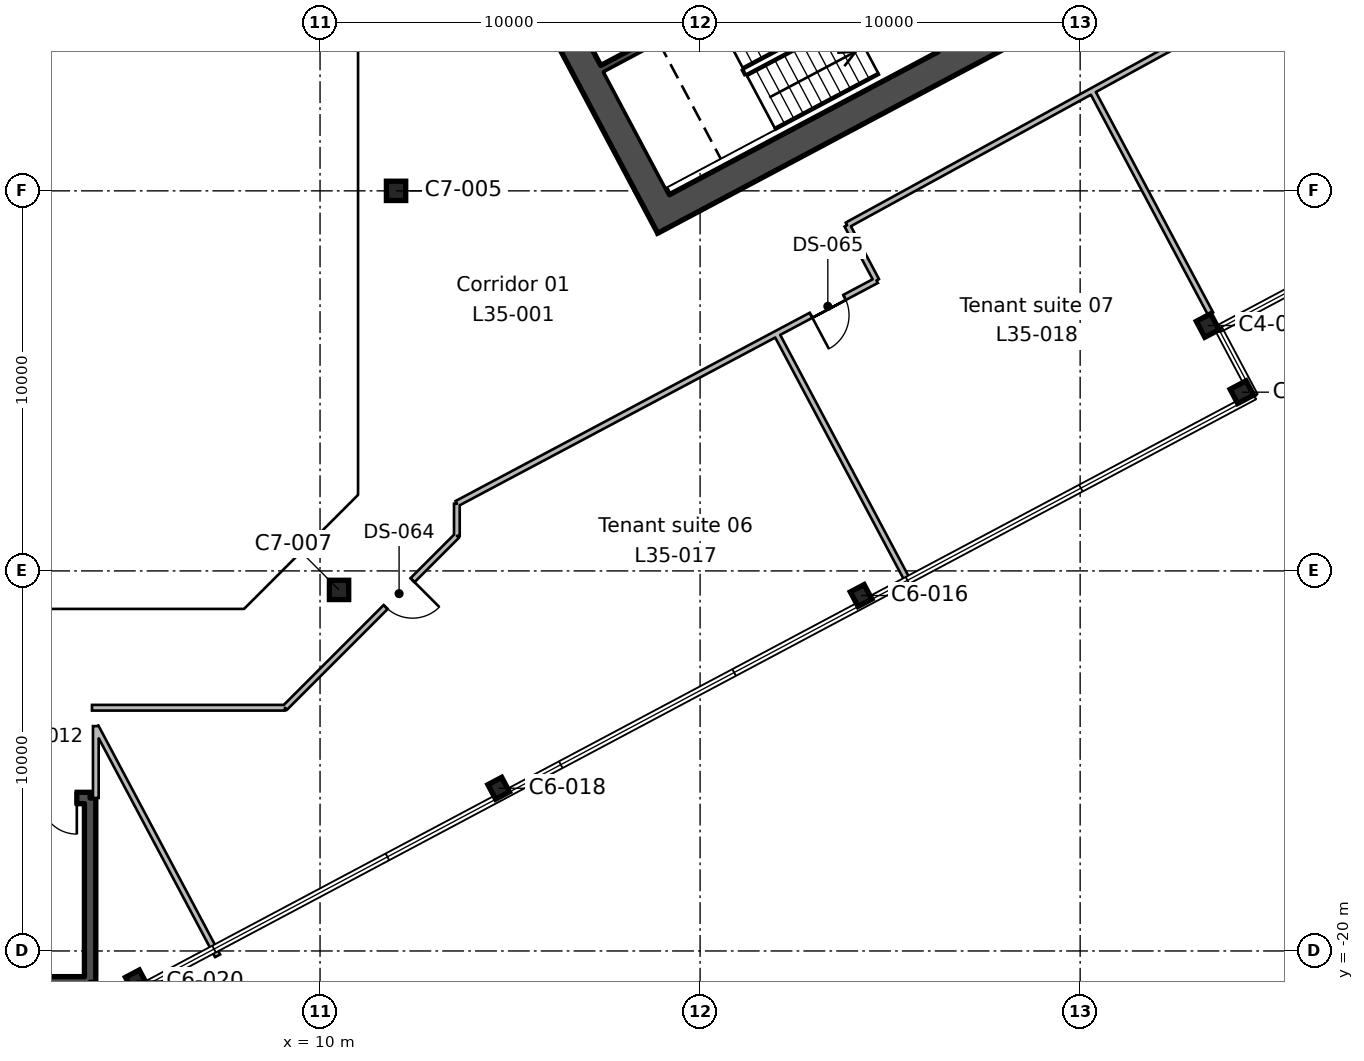
"""IFC4 building model, lengths in metres.
Left out: names, types, materials, properties, quantities, classifications, styles, units other than length and angle.
Written with IfcOpenShell. Run it as: python <this file> out.ifc"""

import sys

from ifc_helpers import new_model, si_unit, direction, frame, frame_2d, origin, origin_2d, place, context, subcontext, project, spatial, rectangle, hollow_rectangle, i_section, extrude, element, fill, save


model = new_model("IFC4")
c1 = context("Model", 3, precision=1e-05, world=origin(), true_north=direction((0.0, 1.0)))
c2 = subcontext(c1, "Body", "Model", "MODEL_VIEW")
j1 = project(units=[si_unit("LENGTHUNIT", "METRE"), si_unit("PLANEANGLEUNIT", "RADIAN")], contexts=[c1])
p1 = place(None, origin())
s1 = spatial("IfcSite", under=j1, at=p1, CompositionType="ELEMENT")
p2 = place(p1, origin())
s2 = spatial("IfcBuilding", under=s1, at=p2, CompositionType="ELEMENT")
p3 = place(p2, frame((0.0, 0.0, 166.2)))
s3 = spatial("IfcBuildingStorey", under=s2, at=p3, CompositionType="ELEMENT", Elevation=166.2)
for number, where, z_axis, x_axis in (
    (1, (5.164, -20.789, 0.0), (0.0, 0.0, 1.0), (0.883, 0.469, 0.0)),
    (2, (14.7, -15.719, 0.0), (0.0, 0.0, 1.0), (0.883, 0.469, 0.0)),
    (3, (24.236, -10.648, 0.0), (0.0, 0.0, 1.0), (0.883, 0.469, 0.0)),
):
    element("IfcColumn", number, at=place(p3, frame(where, z_axis=z_axis, x_axis=x_axis)), inside=s3, PredefinedType="COLUMN", context=c2, shape_type="SweptSolid", body=[
        extrude(i_section(OverallWidth=0.412, OverallDepth=0.434, WebThickness=0.036, FlangeThickness=0.057, FilletRadius=0.015, at=origin_2d()), origin(), (0.0, 0.0, 1.0), 4.0),
    ])
p4 = place(p3, frame((10.5, -10.5, 0.0), z_axis=(0.0, 0.0, 1.0), x_axis=(1.0, 0.0, 0.0)))
e4 = element("IfcColumn", 4, at=p4, inside=s3, PredefinedType="COLUMN", context=c2, shape_type="SweptSolid", body=[
    extrude(hollow_rectangle(XDim=0.508, YDim=0.508, WallThickness=0.012, InnerFilletRadius=0.006, OuterFilletRadius=0.018, at=origin_2d()), origin(), (0.0, 0.0, 1.0), 4.0),
])
for number, where, z_axis, x_axis in (
    (5, (34.256, -5.297, 0.0), (0.0, 0.0, 1.0), (-0.469, 0.883, 0.0)),
    (6, (33.356, -3.543, 0.0), (0.0, 0.0, 1.0), (0.883, 0.469, 0.0)),
):
    element("IfcColumn", number, at=place(p3, frame(where, z_axis=z_axis, x_axis=x_axis)), inside=s3, PredefinedType="COLUMN", context=c2, shape_type="SweptSolid", body=[
        extrude(i_section(OverallWidth=0.424, OverallDepth=0.475, WebThickness=0.048, FlangeThickness=0.077, FilletRadius=0.015, at=origin_2d()), origin(), (0.0, 0.0, 1.0), 4.0),
    ])
p5 = place(p3, frame((12.0, 0.0, 0.0), z_axis=(0.0, 0.0, 1.0), x_axis=(1.0, 0.0, 0.0)))
e7 = element("IfcColumn", 7, at=p5, inside=s3, PredefinedType="COLUMN", context=c2, shape_type="SweptSolid", body=[
    extrude(hollow_rectangle(XDim=0.508, YDim=0.508, WallThickness=0.012, InnerFilletRadius=0.006, OuterFilletRadius=0.018, at=origin_2d()), origin(), (0.0, 0.0, 1.0), 4.0),
])
p6 = place(p3, frame((19.215, -0.939, 0.0), z_axis=(0.0, 0.0, 1.0), x_axis=(-0.469479580143, 0.882943329908, 0.0)))
e8 = element("IfcWall", 8, at=p6, inside=s3, PredefinedType="SHEAR", context=c2, shape_type="SweptSolid", body=[
    extrude(rectangle(XDim=19.7, YDim=0.75, at=frame_2d((9.85, 0.0))), origin(), (0.0, 0.0, 1.0), 4.0),
])
p7 = place(p6, frame((6.85, 0.0, 0.0)))
e9 = element("IfcOpeningElement", 9, at=p7, cuts=e8, PredefinedType="OPENING", context=c2, shape_type="SweptSolid", body=[
    extrude(rectangle(XDim=2.4, YDim=2.4, at=frame_2d((1.2, 1.2))), frame((0.0, 0.385, 0.0), z_axis=(0.0, -1.0, 0.0), x_axis=(1.0, 0.0, 0.0)), (0.0, 0.0, 1.0), 0.77),
])
p8 = place(p3, frame((19.37, -0.432, 0.0), z_axis=(0.0, 0.0, 1.0), x_axis=(0.88294509198, 0.469476266226, 0.0)))
e10 = element("IfcWall", 10, at=p8, inside=s3, PredefinedType="SHEAR", context=c2, shape_type="SweptSolid", body=[
    extrude(rectangle(XDim=20.2, YDim=0.75, at=frame_2d((10.1, 0.0))), origin(), (0.0, 0.0, 1.0), 4.0),
])
p9 = place(p3, frame((17.434, 3.21, 0.0), z_axis=(0.0, 0.0, 1.0), x_axis=(0.882940221191, 0.469485426614, 0.0)))
e11 = element("IfcWall", 11, at=p9, inside=s3, PredefinedType="SHEAR", context=c2, shape_type="SweptSolid", body=[
    extrude(rectangle(XDim=8.0, YDim=0.2, at=frame_2d((4.0, 0.0))), origin(), (0.0, 0.0, 1.0), 4.0),
])
p10 = place(p3, frame((3.95, -15.975, 0.0), z_axis=(0.0, 0.0, 1.0), x_axis=(0.0, -1.0, 0.0)))
e12 = element("IfcWall", 12, at=p10, inside=s3, PredefinedType="SHEAR", context=c2, shape_type="SweptSolid", body=[
    extrude(rectangle(XDim=4.85, YDim=0.3, at=frame_2d((2.425, 0.0))), origin(), (0.0, 0.0, 1.0), 4.0),
])
p11 = place(p3, frame((3.95, -20.825, 0.0), z_axis=(0.0, 0.0, 1.0), x_axis=(-1.0, 0.0, 0.0)))
e13 = element("IfcWall", 13, at=p11, inside=s3, PredefinedType="SHEAR", context=c2, shape_type="SweptSolid", body=[
    extrude(rectangle(XDim=8.3, YDim=0.3, at=frame_2d((4.15, 0.0))), origin(), (0.0, 0.0, 1.0), 4.0),
])
p12 = place(p3, frame((-4.35, -15.975, 0.0), z_axis=(0.0, 0.0, 1.0), x_axis=(1.0, 0.0, 0.0)))
e14 = element("IfcWall", 14, at=p12, inside=s3, PredefinedType="SHEAR", context=c2, shape_type="SweptSolid", body=[
    extrude(rectangle(XDim=8.3, YDim=0.3, at=frame_2d((4.15, 0.0))), origin(), (0.0, 0.0, 1.0), 4.0),
])
p13 = place(p12, frame((6.05, 0.0, 0.0)))
e15 = element("IfcOpeningElement", 15, at=p13, cuts=e14, PredefinedType="OPENING", context=c2, shape_type="SweptSolid", body=[
    extrude(rectangle(XDim=1.9, YDim=2.1, at=frame_2d((0.95, 1.05))), frame((0.0, 0.16, 0.0), z_axis=(0.0, -1.0, 0.0), x_axis=(1.0, 0.0, 0.0)), (0.0, 0.0, 1.0), 0.32),
])
p14 = place(p3, frame((13.6, -8.233, 0.0), z_axis=(0.0, 0.0, 1.0), x_axis=(0.0, -1.0, 0.0)))
e16 = element("IfcWall", 16, at=p14, inside=s3, PredefinedType="PARTITIONING", context=c2, shape_type="SweptSolid", body=[
    extrude(rectangle(XDim=0.844, YDim=0.15, at=frame_2d((0.422, 0.0))), origin(), (0.0, 0.0, 1.0), 3.64),
])
p15 = place(p3, frame((13.6, -9.077, 0.0), z_axis=(0.0, 0.0, 1.0), x_axis=(-0.707106781187, -0.707106781187, 0.0)))
e17 = element("IfcWall", 17, at=p15, inside=s3, PredefinedType="PARTITIONING", context=c2, shape_type="SweptSolid", body=[
    extrude(rectangle(XDim=6.397, YDim=0.15, at=frame_2d((3.198, 0.0))), origin(), (0.0, 0.0, 1.0), 3.64),
])
p16 = place(p15, frame((1.65, 0.0, 0.0)))
e18 = element("IfcOpeningElement", 18, at=p16, cuts=e17, PredefinedType="OPENING", context=c2, shape_type="SweptSolid", body=[
    extrude(rectangle(XDim=1.0, YDim=2.1, at=frame_2d((0.5, 1.05))), frame((0.0, 0.085, 0.0), z_axis=(0.0, -1.0, 0.0), x_axis=(1.0, 0.0, 0.0)), (0.0, 0.0, 1.0), 0.17),
])
p17 = place(p3, frame((9.077, -13.6, 0.0), z_axis=(0.0, 0.0, 1.0), x_axis=(-1.0, 0.0, 0.0)))
e19 = element("IfcWall", 19, at=p17, inside=s3, PredefinedType="PARTITIONING", context=c2, shape_type="SweptSolid", body=[
    extrude(rectangle(XDim=5.078, YDim=0.15, at=frame_2d((2.539, 0.0))), origin(), (0.0, 0.0, 1.0), 3.64),
])
p18 = place(p3, frame((4.1, -14.084, 0.0), z_axis=(0.0, 0.0, 1.0), x_axis=(0.0, -1.0, 0.0)))
e20 = element("IfcWall", 20, at=p18, inside=s3, PredefinedType="PARTITIONING", context=c2, shape_type="SweptSolid", body=[
    extrude(rectangle(XDim=1.891, YDim=0.15, at=frame_2d((0.946, 0.0))), origin(), (0.0, 0.0, 1.0), 3.64),
])
p19 = place(p3, frame((7.304, -20.127, 0.0), z_axis=(0.0, 0.0, 1.0), x_axis=(-0.469394067071, 0.882988793699, 0.0)))
e21 = element("IfcWall", 21, at=p19, inside=s3, PredefinedType="PARTITIONING", context=c2, shape_type="SweptSolid", body=[
    extrude(rectangle(XDim=6.825, YDim=0.15, at=frame_2d((3.413, 0.0))), origin(), (0.0, 0.0, 1.0), 3.64),
])
p20 = place(p3, frame((22.007, -3.758, 0.0), z_axis=(0.0, 0.0, 1.0), x_axis=(0.469527165858, -0.882918025935, 0.0)))
e22 = element("IfcWall", 22, at=p20, inside=s3, PredefinedType="PARTITIONING", context=c2, shape_type="SweptSolid", body=[
    extrude(rectangle(XDim=7.55, YDim=0.15, at=frame_2d((3.775, 0.0))), origin(), (0.0, 0.0, 1.0), 3.64),
])
p21 = place(p3, frame((22.033, -3.745, 0.0), z_axis=(0.0, 0.0, 1.0), x_axis=(-0.882987596652, -0.469396318859, 0.0)))
e23 = element("IfcWall", 23, at=p21, inside=s3, PredefinedType="PARTITIONING", context=c2, shape_type="SweptSolid", body=[
    extrude(rectangle(XDim=9.55, YDim=0.15, at=frame_2d((4.775, 0.0))), origin(), (0.0, 0.0, 1.0), 3.64),
])
p22 = place(p3, frame((23.868, -0.904, 0.0), z_axis=(0.0, 0.0, 1.0), x_axis=(0.469549041813, -0.882906392169, 0.0)))
e24 = element("IfcWall", 24, at=p22, inside=s3, PredefinedType="PARTITIONING", context=c2, shape_type="SweptSolid", body=[
    extrude(rectangle(XDim=1.647, YDim=0.15, at=frame_2d((0.823, 0.0))), origin(), (0.0, 0.0, 1.0), 3.64),
])
p23 = place(p3, frame((24.641, -2.358, 0.0), z_axis=(0.0, 0.0, 1.0), x_axis=(-0.882887698607, -0.46958419016, 0.0)))
e25 = element("IfcWall", 25, at=p23, inside=s3, PredefinedType="PARTITIONING", context=c2, shape_type="SweptSolid", body=[
    extrude(rectangle(XDim=2.954, YDim=0.15, at=frame_2d((1.477, 0.0))), origin(), (0.0, 0.0, 1.0), 3.64),
])
p24 = place(p23, frame((0.95, 0.0, 0.0)))
e26 = element("IfcOpeningElement", 26, at=p24, cuts=e25, PredefinedType="OPENING", context=c2, shape_type="SweptSolid", body=[
    extrude(rectangle(XDim=1.0, YDim=2.1, at=frame_2d((0.5, 1.05))), frame((0.0, 0.085, 0.0), z_axis=(0.0, -1.0, 0.0), x_axis=(1.0, 0.0, 0.0)), (0.0, 0.0, 1.0), 0.17),
])
p25 = place(p3, frame((30.313, 2.631, 0.0), z_axis=(0.0, 0.0, 1.0), x_axis=(0.469521541478, -0.882921016902, 0.0)))
e27 = element("IfcWall", 27, at=p25, inside=s3, PredefinedType="PARTITIONING", context=c2, shape_type="SweptSolid", body=[
    extrude(rectangle(XDim=6.643, YDim=0.15, at=frame_2d((3.321, 0.0))), origin(), (0.0, 0.0, 1.0), 3.64),
])
p26 = place(p3, frame((30.405, 2.681, 0.0), z_axis=(0.0, 0.0, 1.0), x_axis=(-0.877016761441, -0.480459779952, 0.0)))
e28 = element("IfcWall", 28, at=p26, inside=s3, PredefinedType="PARTITIONING", context=c2, shape_type="SweptSolid", body=[
    extrude(rectangle(XDim=7.455, YDim=0.15, at=frame_2d((3.728, 0.0))), origin(), (0.0, 0.0, 1.0), 3.64),
])
p27 = place(p3, frame((48.425, 12.553, 0.0), z_axis=(0.0, 0.0, 1.0), x_axis=(-0.877014972238, -0.480463045894, 0.0)))
e29 = element("IfcWall", 29, at=p27, inside=s3, PredefinedType="PARTITIONING", context=c2, shape_type="SweptSolid", body=[
    extrude(rectangle(XDim=20.547, YDim=0.15, at=frame_2d((10.273, 0.0))), origin(), (0.0, 0.0, 1.0), 3.64),
])
p28 = place(p13, frame((1.9, 0.0, 0.0), z_axis=(0.0, 0.0, 1.0), x_axis=(-1.0, 0.0, 0.0)))
e30 = element("IfcDoor", 30, at=p28, inside=s3, OperationType="DOUBLE_DOOR_SINGLE_SWING", PredefinedType="DOOR", context=c2, shape_type="SweptSolid", body=[
    extrude(rectangle(XDim=1.9, YDim=2.1, at=frame_2d((0.95, 1.05))), frame((0.0, 0.025, 0.0), z_axis=(0.0, -1.0, 0.0), x_axis=(1.0, 0.0, 0.0)), (0.0, 0.0, 1.0), 0.05),
])
fill(e15, e30)
p29 = place(p16, origin())
e31 = element("IfcDoor", 31, at=p29, inside=s3, OperationType="SINGLE_SWING_LEFT", PredefinedType="DOOR", context=c2, shape_type="SweptSolid", body=[
    extrude(rectangle(XDim=1.0, YDim=2.1, at=frame_2d((0.5, 1.05))), frame((0.0, 0.025, 0.0), z_axis=(0.0, -1.0, 0.0), x_axis=(1.0, 0.0, 0.0)), (0.0, 0.0, 1.0), 0.05),
])
fill(e18, e31)
p30 = place(p24, origin())
e32 = element("IfcDoor", 32, at=p30, inside=s3, OperationType="SINGLE_SWING_RIGHT", PredefinedType="DOOR", context=c2, shape_type="SweptSolid", body=[
    extrude(rectangle(XDim=1.0, YDim=2.1, at=frame_2d((0.5, 1.05))), frame((0.0, 0.025, 0.0), z_axis=(0.0, -1.0, 0.0), x_axis=(1.0, 0.0, 0.0)), (0.0, 0.0, 1.0), 0.05),
])
fill(e26, e32)
save(model, sys.argv[1])
